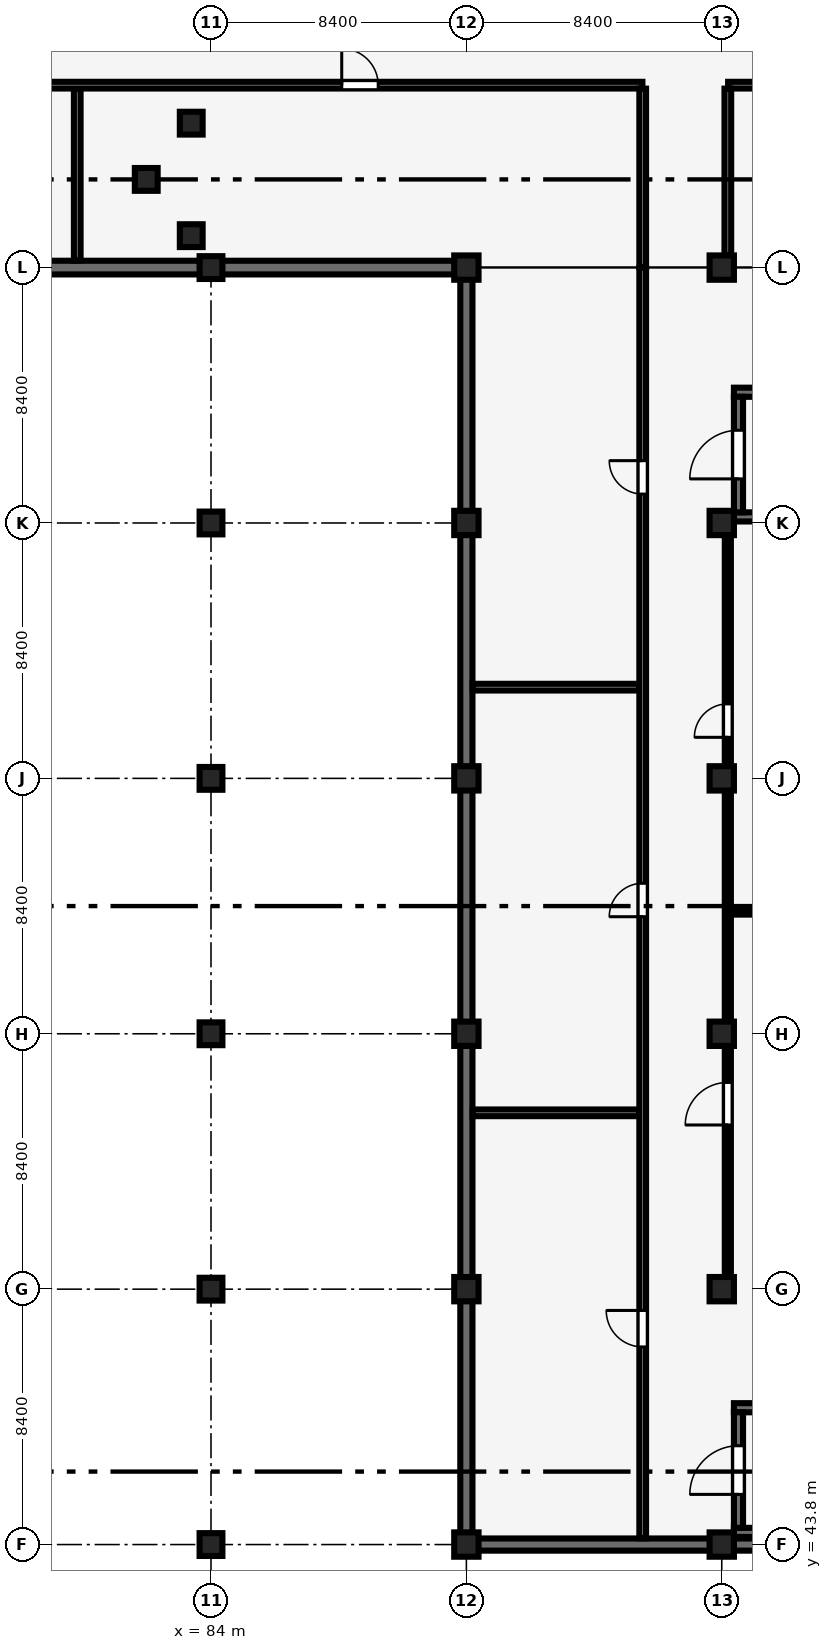
"""IFC4 building model, lengths in metres.
Left out: names, types, materials, properties, quantities, classifications, styles, units other than length and angle.
Written with IfcOpenShell. Run it as: python <this file> out.ifc"""

import sys

from ifc_helpers import new_model, si_unit, direction, frame, frame_2d, origin, origin_2d, place, context, subcontext, project, spatial, rectangle, extrude, element, fill, save


model = new_model("IFC4")
c1 = context("Model", 3, precision=1e-05, world=origin(), true_north=direction((0.0, 1.0)))
c2 = subcontext(c1, "Body", "Model", "MODEL_VIEW")
j1 = project(units=[si_unit("LENGTHUNIT", "METRE"), si_unit("PLANEANGLEUNIT", "RADIAN")], contexts=[c1])
p1 = place(None, origin())
s1 = spatial("IfcSite", under=j1, at=p1, CompositionType="ELEMENT")
p2 = place(p1, origin())
s2 = spatial("IfcBuilding", under=s1, at=p2, CompositionType="ELEMENT")
p3 = place(p2, frame((0.0, 0.0, -4.2)))
s3 = spatial("IfcBuildingStorey", under=s2, at=p3, CompositionType="ELEMENT", Elevation=-4.2)
for number, where, z_axis, x_axis in (
    (1, (92.4, 43.8, 0.0), (0.0, 0.0, 1.0), (1.0, 0.0, 0.0)),
    (2, (92.4, 52.2, 0.0), (0.0, 0.0, 1.0), (1.0, 0.0, 0.0)),
    (3, (92.4, 60.6, 0.0), (0.0, 0.0, 1.0), (1.0, 0.0, 0.0)),
    (4, (92.4, 69.0, 0.0), (0.0, 0.0, 1.0), (1.0, 0.0, 0.0)),
    (5, (92.4, 77.4, 0.0), (0.0, 0.0, 1.0), (1.0, 0.0, 0.0)),
    (6, (92.4, 85.8, 0.0), (0.0, 0.0, 1.0), (1.0, 0.0, 0.0)),
    (7, (100.8, 43.8, 0.0), (0.0, 0.0, 1.0), (1.0, 0.0, 0.0)),
    (8, (100.8, 52.2, 0.0), (0.0, 0.0, 1.0), (1.0, 0.0, 0.0)),
    (9, (100.8, 60.6, 0.0), (0.0, 0.0, 1.0), (1.0, 0.0, 0.0)),
    (10, (100.8, 69.0, 0.0), (0.0, 0.0, 1.0), (1.0, 0.0, 0.0)),
    (11, (100.8, 77.4, 0.0), (0.0, 0.0, 1.0), (1.0, 0.0, 0.0)),
    (12, (100.8, 85.8, 0.0), (0.0, 0.0, 1.0), (1.0, 0.0, 0.0)),
):
    element("IfcColumn", number, at=place(p3, frame(where, z_axis=z_axis, x_axis=x_axis)), inside=s3, PredefinedType="COLUMN", context=c2, shape_type="SweptSolid", body=[
        extrude(rectangle(XDim=0.8, YDim=0.8, at=origin_2d()), origin(), (0.0, 0.0, 1.0), 4.2),
    ])
for number, where, z_axis, x_axis in (
    (13, (84.0, 43.8, 0.0), (0.0, 0.0, 1.0), (1.0, 0.0, 0.0)),
    (14, (84.0, 52.2, 0.0), (0.0, 0.0, 1.0), (1.0, 0.0, 0.0)),
    (15, (84.0, 60.6, 0.0), (0.0, 0.0, 1.0), (1.0, 0.0, 0.0)),
    (16, (84.0, 69.0, 0.0), (0.0, 0.0, 1.0), (1.0, 0.0, 0.0)),
    (17, (84.0, 77.4, 0.0), (0.0, 0.0, 1.0), (1.0, 0.0, 0.0)),
    (18, (84.0, 85.8, 0.0), (0.0, 0.0, 1.0), (1.0, 0.0, 0.0)),
):
    element("IfcColumn", number, at=place(p3, frame(where, z_axis=z_axis, x_axis=x_axis)), inside=s3, PredefinedType="COLUMN", context=c2, shape_type="SweptSolid", body=[
        extrude(rectangle(XDim=0.75, YDim=0.75, at=origin_2d()), origin(), (0.0, 0.0, 1.0), 4.2),
    ])
p4 = place(p3, frame((75.95, 85.8, 0.0), z_axis=(0.0, 0.0, 1.0), x_axis=(1.0, 0.0, 0.0)))
e19 = element("IfcWall", 19, at=p4, inside=s3, PredefinedType="SHEAR", context=c2, shape_type="SweptSolid", body=[
    extrude(rectangle(XDim=7.7, YDim=0.45, at=frame_2d((3.85, 0.0))), origin(), (0.0, 0.0, 1.0), 3.1),
])
p5 = place(p3, frame((84.35, 85.8, 0.0), z_axis=(0.0, 0.0, 1.0), x_axis=(1.0, 0.0, 0.0)))
e20 = element("IfcWall", 20, at=p5, inside=s3, PredefinedType="SHEAR", context=c2, shape_type="SweptSolid", body=[
    extrude(rectangle(XDim=7.675, YDim=0.45, at=frame_2d((3.837, 0.0))), origin(), (0.0, 0.0, 1.0), 3.05),
])
p6 = place(p3, frame((92.4, 44.175, 0.0), z_axis=(0.0, 0.0, 1.0), x_axis=(0.0, 1.0, 0.0)))
e21 = element("IfcWall", 21, at=p6, inside=s3, PredefinedType="SHEAR", context=c2, shape_type="SweptSolid", body=[
    extrude(rectangle(XDim=7.65, YDim=0.4, at=frame_2d((3.825, 0.0))), origin(), (0.0, 0.0, 1.0), 3.15),
])
p7 = place(p3, frame((92.4, 52.575, 0.0), z_axis=(0.0, 0.0, 1.0), x_axis=(0.0, 1.0, 0.0)))
e22 = element("IfcWall", 22, at=p7, inside=s3, PredefinedType="SHEAR", context=c2, shape_type="SweptSolid", body=[
    extrude(rectangle(XDim=7.65, YDim=0.4, at=frame_2d((3.825, 0.0))), origin(), (0.0, 0.0, 1.0), 3.2),
])
p8 = place(p3, frame((92.4, 60.975, 0.0), z_axis=(0.0, 0.0, 1.0), x_axis=(0.0, 1.0, 0.0)))
e23 = element("IfcWall", 23, at=p8, inside=s3, PredefinedType="SHEAR", context=c2, shape_type="SweptSolid", body=[
    extrude(rectangle(XDim=7.65, YDim=0.4, at=frame_2d((3.825, 0.0))), origin(), (0.0, 0.0, 1.0), 3.15),
])
p9 = place(p3, frame((92.4, 69.375, 0.0), z_axis=(0.0, 0.0, 1.0), x_axis=(0.0, 1.0, 0.0)))
e24 = element("IfcWall", 24, at=p9, inside=s3, PredefinedType="SHEAR", context=c2, shape_type="SweptSolid", body=[
    extrude(rectangle(XDim=7.65, YDim=0.4, at=frame_2d((3.825, 0.0))), origin(), (0.0, 0.0, 1.0), 3.1),
])
p10 = place(p3, frame((92.4, 77.775, 0.0), z_axis=(0.0, 0.0, 1.0), x_axis=(0.0, 1.0, 0.0)))
e25 = element("IfcWall", 25, at=p10, inside=s3, PredefinedType="SHEAR", context=c2, shape_type="SweptSolid", body=[
    extrude(rectangle(XDim=7.65, YDim=0.4, at=frame_2d((3.825, 0.0))), origin(), (0.0, 0.0, 1.0), 3.05),
])
p11 = place(p3, frame((92.775, 43.8, 0.0), z_axis=(0.0, 0.0, 1.0), x_axis=(1.0, 0.0, 0.0)))
e26 = element("IfcWall", 26, at=p11, inside=s3, PredefinedType="SHEAR", context=c2, shape_type="SweptSolid", body=[
    extrude(rectangle(XDim=7.65, YDim=0.4, at=frame_2d((3.825, 0.0))), origin(), (0.0, 0.0, 1.0), 3.25),
])
p12 = place(p3, frame((101.175, 43.8, 0.0), z_axis=(0.0, 0.0, 1.0), x_axis=(1.0, 0.0, 0.0)))
e27 = element("IfcWall", 27, at=p12, inside=s3, PredefinedType="SHEAR", context=c2, shape_type="SweptSolid", body=[
    extrude(rectangle(XDim=7.65, YDim=0.4, at=frame_2d((3.825, 0.0))), origin(), (0.0, 0.0, 1.0), 3.25),
])
for number, where, z_axis, x_axis in (
    (28, (101.2, 44.2, 0.0), (0.0, 0.0, 1.0), (1.0, 0.0, 0.0)),
    (29, (101.2, 48.3, 0.0), (0.0, 0.0, 1.0), (1.0, 0.0, 0.0)),
):
    element("IfcWall", number, at=place(p3, frame(where, z_axis=z_axis, x_axis=x_axis)), inside=s3, PredefinedType="SHEAR", context=c2, shape_type="SweptSolid", body=[
        extrude(rectangle(XDim=7.6, YDim=0.3, at=frame_2d((3.8, 0.0))), origin(), (0.0, 0.0, 1.0), 4.025),
    ])
p13 = place(p3, frame((101.35, 44.35, 0.0), z_axis=(0.0, 0.0, 1.0), x_axis=(0.0, 1.0, 0.0)))
e30 = element("IfcWall", 30, at=p13, inside=s3, PredefinedType="SHEAR", context=c2, shape_type="SweptSolid", body=[
    extrude(rectangle(XDim=3.8, YDim=0.3, at=frame_2d((1.9, 0.0))), origin(), (0.0, 0.0, 1.0), 4.025),
])
p14 = place(p13, frame((1.1, 0.0, 0.0)))
e31 = element("IfcOpeningElement", 31, at=p14, cuts=e30, PredefinedType="OPENING", context=c2, shape_type="SweptSolid", body=[
    extrude(rectangle(XDim=1.6, YDim=2.2, at=frame_2d((0.8, 1.1))), frame((0.0, 0.16, 0.0), z_axis=(0.0, -1.0, 0.0), x_axis=(1.0, 0.0, 0.0)), (0.0, 0.0, 1.0), 0.32),
])
for number, where, z_axis, x_axis in (
    (32, (101.2, 77.6, 0.0), (0.0, 0.0, 1.0), (1.0, 0.0, 0.0)),
    (33, (101.2, 81.7, 0.0), (0.0, 0.0, 1.0), (1.0, 0.0, 0.0)),
):
    element("IfcWall", number, at=place(p3, frame(where, z_axis=z_axis, x_axis=x_axis)), inside=s3, PredefinedType="SHEAR", context=c2, shape_type="SweptSolid", body=[
        extrude(rectangle(XDim=7.6, YDim=0.3, at=frame_2d((3.8, 0.0))), origin(), (0.0, 0.0, 1.0), 4.025),
    ])
p15 = place(p3, frame((101.35, 77.75, 0.0), z_axis=(0.0, 0.0, 1.0), x_axis=(0.0, 1.0, 0.0)))
e34 = element("IfcWall", 34, at=p15, inside=s3, PredefinedType="SHEAR", context=c2, shape_type="SweptSolid", body=[
    extrude(rectangle(XDim=3.8, YDim=0.3, at=frame_2d((1.9, 0.0))), origin(), (0.0, 0.0, 1.0), 4.025),
])
p16 = place(p15, frame((1.1, 0.0, 0.0)))
e35 = element("IfcOpeningElement", 35, at=p16, cuts=e34, PredefinedType="OPENING", context=c2, shape_type="SweptSolid", body=[
    extrude(rectangle(XDim=1.6, YDim=2.2, at=frame_2d((0.8, 1.1))), frame((0.0, 0.16, 0.0), z_axis=(0.0, -1.0, 0.0), x_axis=(1.0, 0.0, 0.0)), (0.0, 0.0, 1.0), 0.32),
])
for number, where, z_axis, x_axis in (
    (36, (83.35, 86.85, 0.0), (0.0, 0.0, 1.0), (1.0, 0.0, 0.0)),
    (37, (83.35, 90.55, 0.0), (0.0, 0.0, 1.0), (1.0, 0.0, 0.0)),
    (38, (81.87, 88.7, 0.0), (0.0, 0.0, 1.0), (1.0, 0.0, 0.0)),
):
    element("IfcColumn", number, at=place(p3, frame(where, z_axis=z_axis, x_axis=x_axis)), inside=s3, PredefinedType="COLUMN", context=c2, shape_type="SweptSolid", body=[
        extrude(rectangle(XDim=0.75, YDim=0.75, at=origin_2d()), origin(), (0.0, 0.0, 1.0), 4.2),
    ])
p17 = place(p3, frame((79.6, 86.03, 0.0), z_axis=(0.0, 0.0, 1.0), x_axis=(0.0, 1.0, 0.0)))
e39 = element("IfcWall", 39, at=p17, inside=s3, PredefinedType="SOLIDWALL", context=c2, shape_type="SweptSolid", body=[
    extrude(rectangle(XDim=5.655, YDim=0.22, at=frame_2d((2.828, 0.0))), origin(), (0.0, 0.0, 1.0), 3.9),
])
p18 = place(p3, frame((42.205, 91.8, 0.0), z_axis=(0.0, 0.0, 1.0), x_axis=(1.0, 0.0, 0.0)))
e40 = element("IfcWall", 40, at=p18, inside=s3, PredefinedType="SOLIDWALL", context=c2, shape_type="SweptSolid", body=[
    extrude(rectangle(XDim=55.985, YDim=0.22, at=frame_2d((27.992, 0.0))), origin(), (0.0, 0.0, 1.0), 3.9),
])
p19 = place(p18, frame((8.595, 0.0, 0.0)))
e41 = element("IfcOpeningElement", 41, at=p19, cuts=e40, PredefinedType="OPENING", context=c2, shape_type="SweptSolid", body=[
    extrude(rectangle(XDim=1.2, YDim=2.4, at=frame_2d((0.6, 1.2))), frame((0.0, 0.12, 0.0), z_axis=(0.0, -1.0, 0.0), x_axis=(1.0, 0.0, 0.0)), (0.0, 0.0, 1.0), 0.24),
])
p20 = place(p18, frame((27.395, 0.0, 0.0)))
e42 = element("IfcOpeningElement", 42, at=p20, cuts=e40, PredefinedType="OPENING", context=c2, shape_type="SweptSolid", body=[
    extrude(rectangle(XDim=1.2, YDim=2.4, at=frame_2d((0.6, 1.2))), frame((0.0, 0.12, 0.0), z_axis=(0.0, -1.0, 0.0), x_axis=(1.0, 0.0, 0.0)), (0.0, 0.0, 1.0), 0.24),
])
p21 = place(p18, frame((46.095, 0.0, 0.0)))
e43 = element("IfcOpeningElement", 43, at=p21, cuts=e40, PredefinedType="OPENING", context=c2, shape_type="SweptSolid", body=[
    extrude(rectangle(XDim=1.2, YDim=2.4, at=frame_2d((0.6, 1.2))), frame((0.0, 0.12, 0.0), z_axis=(0.0, -1.0, 0.0), x_axis=(1.0, 0.0, 0.0)), (0.0, 0.0, 1.0), 0.24),
])
p22 = place(p3, frame((98.2, 85.81, 0.0), z_axis=(0.0, 0.0, 1.0), x_axis=(0.0, 1.0, 0.0)))
e44 = element("IfcWall", 44, at=p22, inside=s3, PredefinedType="SOLIDWALL", context=c2, shape_type="SweptSolid", body=[
    extrude(rectangle(XDim=5.875, YDim=0.22, at=frame_2d((2.938, 0.0))), origin(), (0.0, 0.0, 1.0), 3.9),
])
p23 = place(p3, frame((101.01, 91.8, 0.0), z_axis=(0.0, 0.0, 1.0), x_axis=(1.0, 0.0, 0.0)))
e45 = element("IfcWall", 45, at=p23, inside=s3, PredefinedType="SOLIDWALL", context=c2, shape_type="SweptSolid", body=[
    extrude(rectangle(XDim=7.985, YDim=0.22, at=frame_2d((3.993, 0.0))), origin(), (0.0, 0.0, 1.0), 3.9),
])
p24 = place(p23, frame((3.49, 0.0, 0.0)))
e46 = element("IfcOpeningElement", 46, at=p24, cuts=e45, PredefinedType="OPENING", context=c2, shape_type="SweptSolid", body=[
    extrude(rectangle(XDim=1.2, YDim=2.4, at=frame_2d((0.6, 1.2))), frame((0.0, 0.12, 0.0), z_axis=(0.0, -1.0, 0.0), x_axis=(1.0, 0.0, 0.0)), (0.0, 0.0, 1.0), 0.24),
])
p25 = place(p3, frame((101.0, 86.21, 0.0), z_axis=(0.0, 0.0, 1.0), x_axis=(0.0, 1.0, 0.0)))
e47 = element("IfcWall", 47, at=p25, inside=s3, PredefinedType="SOLIDWALL", context=c2, shape_type="SweptSolid", body=[
    extrude(rectangle(XDim=5.475, YDim=0.22, at=frame_2d((2.738, 0.0))), origin(), (0.0, 0.0, 1.0), 3.25),
])
for number, where, z_axis, x_axis in (
    (48, (92.605, 58.0, 0.0), (0.0, 0.0, 1.0), (1.0, 0.0, 0.0)),
    (49, (92.605, 72.0, 0.0), (0.0, 0.0, 1.0), (1.0, 0.0, 0.0)),
):
    element("IfcWall", number, at=place(p3, frame(where, z_axis=z_axis, x_axis=x_axis)), inside=s3, PredefinedType="SOLIDWALL", context=c2, shape_type="SweptSolid", body=[
        extrude(rectangle(XDim=5.48, YDim=0.22, at=frame_2d((2.74, 0.0))), origin(), (0.0, 0.0, 1.0), 3.9),
    ])
p26 = place(p3, frame((98.2, 44.005, 0.0), z_axis=(0.0, 0.0, 1.0), x_axis=(0.0, 1.0, 0.0)))
e50 = element("IfcWall", 50, at=p26, inside=s3, PredefinedType="SOLIDWALL", context=c2, shape_type="SweptSolid", body=[
    extrude(rectangle(XDim=41.785, YDim=0.22, at=frame_2d((20.893, 0.0))), origin(), (0.0, 0.0, 1.0), 3.9),
])
p27 = place(p26, frame((6.295, 0.0, 0.0)))
e51 = element("IfcOpeningElement", 51, at=p27, cuts=e50, PredefinedType="OPENING", context=c2, shape_type="SweptSolid", body=[
    extrude(rectangle(XDim=1.2, YDim=2.4, at=frame_2d((0.6, 1.2))), frame((0.0, 0.12, 0.0), z_axis=(0.0, -1.0, 0.0), x_axis=(1.0, 0.0, 0.0)), (0.0, 0.0, 1.0), 0.24),
])
p28 = place(p26, frame((20.445, 0.0, 0.0)))
e52 = element("IfcOpeningElement", 52, at=p28, cuts=e50, PredefinedType="OPENING", context=c2, shape_type="SweptSolid", body=[
    extrude(rectangle(XDim=1.1, YDim=2.15, at=frame_2d((0.55, 1.075))), frame((0.0, 0.12, 0.0), z_axis=(0.0, -1.0, 0.0), x_axis=(1.0, 0.0, 0.0)), (0.0, 0.0, 1.0), 0.24),
])
p29 = place(p26, frame((34.345, 0.0, 0.0)))
e53 = element("IfcOpeningElement", 53, at=p29, cuts=e50, PredefinedType="OPENING", context=c2, shape_type="SweptSolid", body=[
    extrude(rectangle(XDim=1.1, YDim=2.15, at=frame_2d((0.55, 1.075))), frame((0.0, 0.12, 0.0), z_axis=(0.0, -1.0, 0.0), x_axis=(1.0, 0.0, 0.0)), (0.0, 0.0, 1.0), 0.24),
])
p30 = place(p3, frame((101.105, 64.6, 0.0), z_axis=(0.0, 0.0, 1.0), x_axis=(1.0, 0.0, 0.0)))
e54 = element("IfcWall", 54, at=p30, inside=s3, PredefinedType="PARTITIONING", context=c2, shape_type="SweptSolid", body=[
    extrude(rectangle(XDim=7.89, YDim=0.16, at=frame_2d((3.945, 0.0))), origin(), (0.0, 0.0, 1.0), 3.9),
])
p31 = place(p3, frame((101.0, 52.61, 0.0), z_axis=(0.0, 0.0, 1.0), x_axis=(0.0, 1.0, 0.0)))
e55 = element("IfcWall", 55, at=p31, inside=s3, PredefinedType="PARTITIONING", context=c2, shape_type="SweptSolid", body=[
    extrude(rectangle(XDim=7.58, YDim=0.2, at=frame_2d((3.79, 0.0))), origin(), (0.0, 0.0, 1.0), 2.85),
])
p32 = place(p31, frame((4.99, 0.0, 0.0)))
e56 = element("IfcOpeningElement", 56, at=p32, cuts=e55, PredefinedType="OPENING", context=c2, shape_type="SweptSolid", body=[
    extrude(rectangle(XDim=1.4, YDim=2.2, at=frame_2d((0.7, 1.1))), frame((0.0, 0.11, 0.0), z_axis=(0.0, -1.0, 0.0), x_axis=(1.0, 0.0, 0.0)), (0.0, 0.0, 1.0), 0.22),
])
p33 = place(p3, frame((101.0, 61.01, 0.0), z_axis=(0.0, 0.0, 1.0), x_axis=(0.0, 1.0, 0.0)))
e57 = element("IfcWall", 57, at=p33, inside=s3, PredefinedType="PARTITIONING", context=c2, shape_type="SweptSolid", body=[
    extrude(rectangle(XDim=7.58, YDim=0.2, at=frame_2d((3.79, 0.0))), origin(), (0.0, 0.0, 1.0), 2.8),
])
p34 = place(p3, frame((101.0, 69.41, 0.0), z_axis=(0.0, 0.0, 1.0), x_axis=(0.0, 1.0, 0.0)))
e58 = element("IfcWall", 58, at=p34, inside=s3, PredefinedType="PARTITIONING", context=c2, shape_type="SweptSolid", body=[
    extrude(rectangle(XDim=7.78, YDim=0.2, at=frame_2d((3.89, 0.0))), origin(), (0.0, 0.0, 1.0), 2.7),
])
p35 = place(p34, frame((0.94, 0.0, 0.0)))
e59 = element("IfcOpeningElement", 59, at=p35, cuts=e58, PredefinedType="OPENING", context=c2, shape_type="SweptSolid", body=[
    extrude(rectangle(XDim=1.1, YDim=2.15, at=frame_2d((0.55, 1.075))), frame((0.0, 0.11, 0.0), z_axis=(0.0, -1.0, 0.0), x_axis=(1.0, 0.0, 0.0)), (0.0, 0.0, 1.0), 0.22),
])
p36 = place(p14, origin())
e60 = element("IfcDoor", 60, at=p36, inside=s3, OperationType="DOUBLE_DOOR_SINGLE_SWING", PredefinedType="DOOR", context=c2, shape_type="SweptSolid", body=[
    extrude(rectangle(XDim=1.6, YDim=2.2, at=frame_2d((0.8, 1.1))), frame((0.0, 0.025, 0.0), z_axis=(0.0, -1.0, 0.0), x_axis=(1.0, 0.0, 0.0)), (0.0, 0.0, 1.0), 0.05),
])
fill(e31, e60)
p37 = place(p16, origin())
e61 = element("IfcDoor", 61, at=p37, inside=s3, OperationType="DOUBLE_DOOR_SINGLE_SWING", PredefinedType="DOOR", context=c2, shape_type="SweptSolid", body=[
    extrude(rectangle(XDim=1.6, YDim=2.2, at=frame_2d((0.8, 1.1))), frame((0.0, 0.025, 0.0), z_axis=(0.0, -1.0, 0.0), x_axis=(1.0, 0.0, 0.0)), (0.0, 0.0, 1.0), 0.05),
])
fill(e35, e61)
p38 = place(p21, origin())
e62 = element("IfcDoor", 62, at=p38, inside=s3, OperationType="SINGLE_SWING_LEFT", PredefinedType="DOOR", context=c2, shape_type="SweptSolid", body=[
    extrude(rectangle(XDim=1.2, YDim=2.4, at=frame_2d((0.6, 1.2))), frame((0.0, 0.025, 0.0), z_axis=(0.0, -1.0, 0.0), x_axis=(1.0, 0.0, 0.0)), (0.0, 0.0, 1.0), 0.05),
])
fill(e43, e62)
p39 = place(p27, origin())
e63 = element("IfcDoor", 63, at=p39, inside=s3, OperationType="SINGLE_SWING_RIGHT", PredefinedType="DOOR", context=c2, shape_type="SweptSolid", body=[
    extrude(rectangle(XDim=1.2, YDim=2.4, at=frame_2d((0.6, 1.2))), frame((0.0, 0.025, 0.0), z_axis=(0.0, -1.0, 0.0), x_axis=(1.0, 0.0, 0.0)), (0.0, 0.0, 1.0), 0.05),
])
fill(e51, e63)
p40 = place(p28, origin())
e64 = element("IfcDoor", 64, at=p40, inside=s3, OperationType="SINGLE_SWING_LEFT", PredefinedType="DOOR", context=c2, shape_type="SweptSolid", body=[
    extrude(rectangle(XDim=1.1, YDim=2.15, at=frame_2d((0.55, 1.075))), frame((0.0, 0.025, 0.0), z_axis=(0.0, -1.0, 0.0), x_axis=(1.0, 0.0, 0.0)), (0.0, 0.0, 1.0), 0.05),
])
fill(e52, e64)
p41 = place(p29, origin())
e65 = element("IfcDoor", 65, at=p41, inside=s3, OperationType="SINGLE_SWING_RIGHT", PredefinedType="DOOR", context=c2, shape_type="SweptSolid", body=[
    extrude(rectangle(XDim=1.1, YDim=2.15, at=frame_2d((0.55, 1.075))), frame((0.0, 0.025, 0.0), z_axis=(0.0, -1.0, 0.0), x_axis=(1.0, 0.0, 0.0)), (0.0, 0.0, 1.0), 0.05),
])
fill(e53, e65)
p42 = place(p32, origin())
e66 = element("IfcDoor", 66, at=p42, inside=s3, OperationType="DOUBLE_DOOR_SINGLE_SWING", PredefinedType="DOOR", context=c2, shape_type="SweptSolid", body=[
    extrude(rectangle(XDim=1.4, YDim=2.2, at=frame_2d((0.7, 1.1))), frame((0.0, 0.025, 0.0), z_axis=(0.0, -1.0, 0.0), x_axis=(1.0, 0.0, 0.0)), (0.0, 0.0, 1.0), 0.05),
])
fill(e56, e66)
p43 = place(p35, origin())
e67 = element("IfcDoor", 67, at=p43, inside=s3, OperationType="SINGLE_SWING_LEFT", PredefinedType="DOOR", context=c2, shape_type="SweptSolid", body=[
    extrude(rectangle(XDim=1.1, YDim=2.15, at=frame_2d((0.55, 1.075))), frame((0.0, 0.025, 0.0), z_axis=(0.0, -1.0, 0.0), x_axis=(1.0, 0.0, 0.0)), (0.0, 0.0, 1.0), 0.05),
])
fill(e59, e67)
save(model, sys.argv[1])
